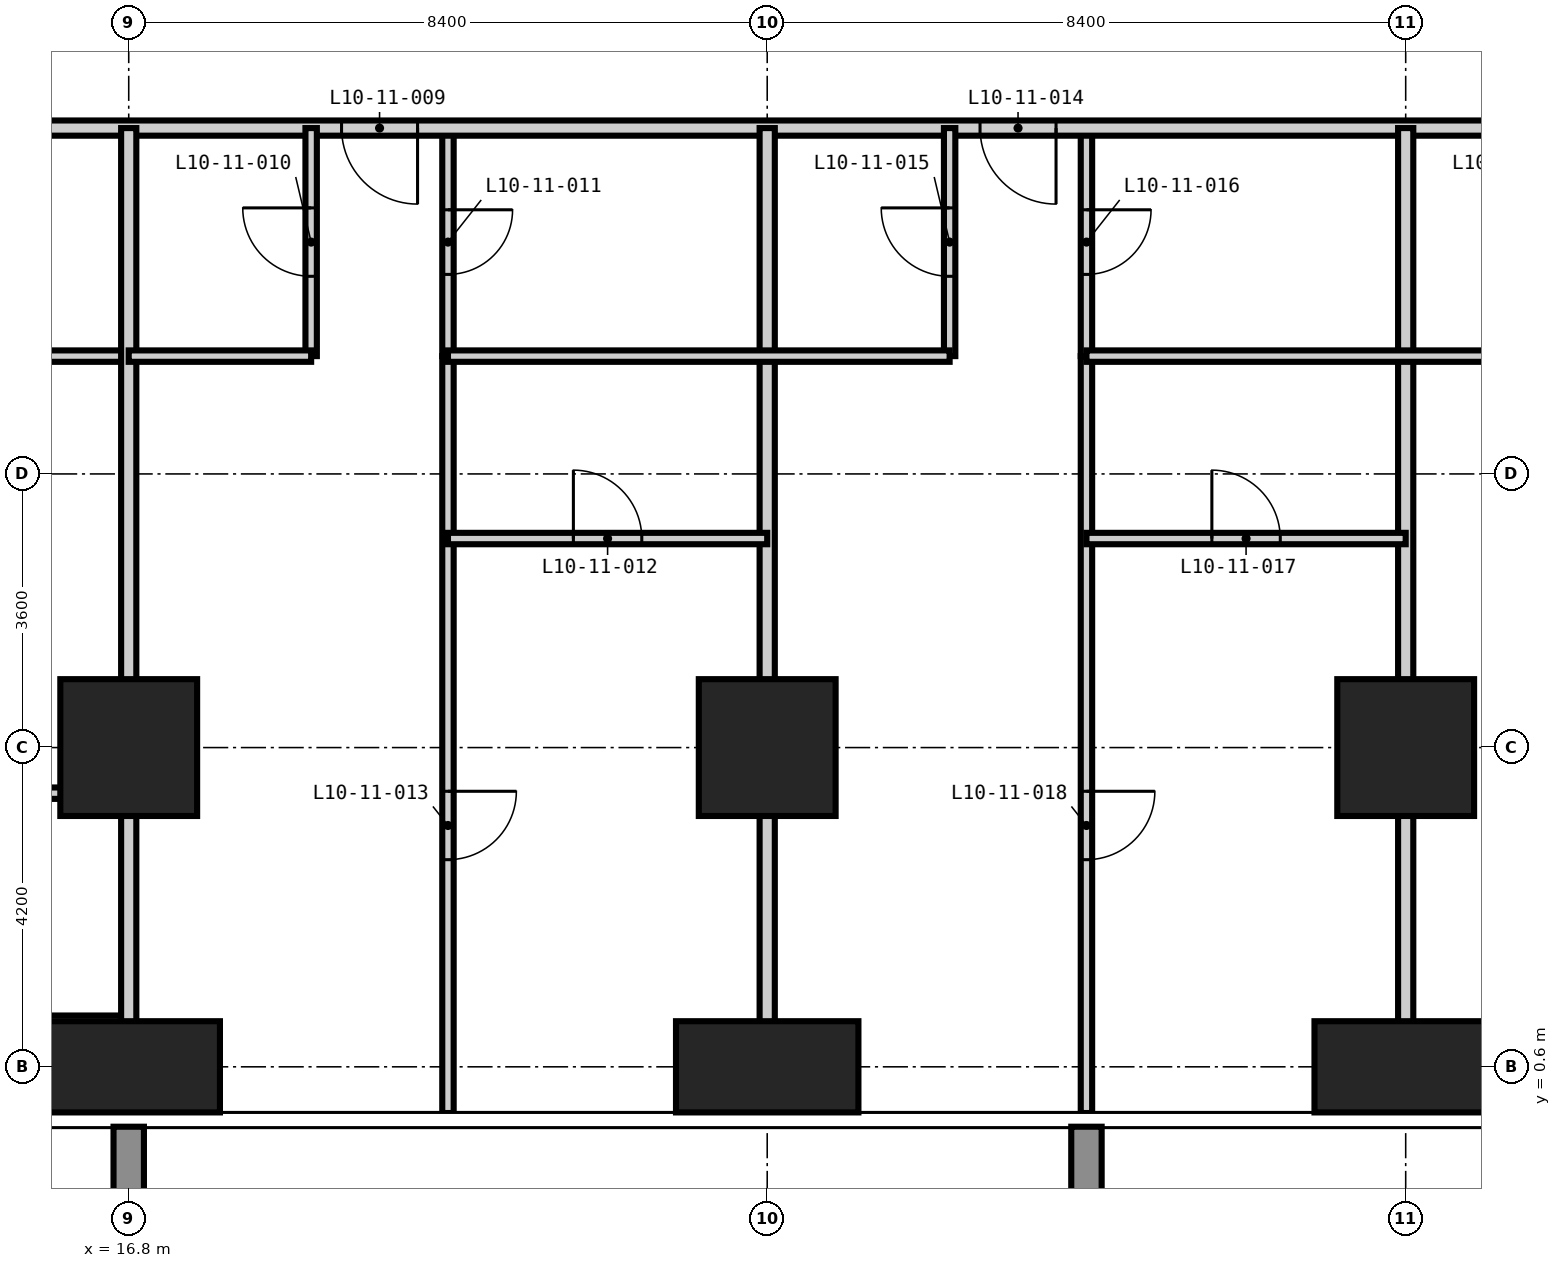
"""IFC4 building model, lengths in metres.
Left out: names, types, materials, properties, quantities, classifications, styles, units other than length and angle.
Written with IfcOpenShell. Run it as: python <this file> out.ifc"""

import sys

from ifc_helpers import new_model, si_unit, direction, frame, frame_2d, origin, origin_2d, place, context, subcontext, project, spatial, rectangle, extrude, element, fill, save


model = new_model("IFC4")
c1 = context("Model", 3, precision=1e-05, world=origin(), true_north=direction((0.0, 1.0)))
c2 = subcontext(c1, "Body", "Model", "MODEL_VIEW")
j1 = project(units=[si_unit("LENGTHUNIT", "METRE"), si_unit("PLANEANGLEUNIT", "RADIAN")], contexts=[c1])
p1 = place(None, origin())
s1 = spatial("IfcSite", under=j1, at=p1, CompositionType="ELEMENT")
p2 = place(p1, origin())
s2 = spatial("IfcBuilding", under=s1, at=p2, CompositionType="ELEMENT")
p3 = place(p2, frame((0.0, 0.0, 45.0)))
s3 = spatial("IfcBuildingStorey", under=s2, at=p3, CompositionType="ELEMENT", Elevation=45.0)
p4 = place(p3, frame((16.8, 0.6, -0.35), z_axis=(0.0, 0.0, 1.0), x_axis=(1.0, 0.0, 0.0)))
e1 = element("IfcColumn", 1, at=p4, inside=s3, PredefinedType="COLUMN", context=c2, shape_type="SweptSolid", body=[
    extrude(rectangle(XDim=2.4, YDim=1.2, at=origin_2d()), origin(), (0.0, 0.0, 1.0), 3.6),
])
p5 = place(p3, frame((16.8, 4.8, -0.35), z_axis=(0.0, 0.0, 1.0), x_axis=(1.0, 0.0, 0.0)))
e2 = element("IfcColumn", 2, at=p5, inside=s3, PredefinedType="COLUMN", context=c2, shape_type="SweptSolid", body=[
    extrude(rectangle(XDim=1.8, YDim=1.8, at=origin_2d()), origin(), (0.0, 0.0, 1.0), 3.6),
])
p6 = place(p3, frame((25.2, 0.6, -0.35), z_axis=(0.0, 0.0, 1.0), x_axis=(1.0, 0.0, 0.0)))
e3 = element("IfcColumn", 3, at=p6, inside=s3, PredefinedType="COLUMN", context=c2, shape_type="SweptSolid", body=[
    extrude(rectangle(XDim=2.4, YDim=1.2, at=origin_2d()), origin(), (0.0, 0.0, 1.0), 3.6),
])
p7 = place(p3, frame((25.2, 4.8, -0.35), z_axis=(0.0, 0.0, 1.0), x_axis=(1.0, 0.0, 0.0)))
e4 = element("IfcColumn", 4, at=p7, inside=s3, PredefinedType="COLUMN", context=c2, shape_type="SweptSolid", body=[
    extrude(rectangle(XDim=1.8, YDim=1.8, at=origin_2d()), origin(), (0.0, 0.0, 1.0), 3.6),
])
p8 = place(p3, frame((33.6, 0.6, -0.35), z_axis=(0.0, 0.0, 1.0), x_axis=(1.0, 0.0, 0.0)))
e5 = element("IfcColumn", 5, at=p8, inside=s3, PredefinedType="COLUMN", context=c2, shape_type="SweptSolid", body=[
    extrude(rectangle(XDim=2.4, YDim=1.2, at=origin_2d()), origin(), (0.0, 0.0, 1.0), 3.6),
])
p9 = place(p3, frame((33.6, 4.8, -0.35), z_axis=(0.0, 0.0, 1.0), x_axis=(1.0, 0.0, 0.0)))
e6 = element("IfcColumn", 6, at=p9, inside=s3, PredefinedType="COLUMN", context=c2, shape_type="SweptSolid", body=[
    extrude(rectangle(XDim=1.8, YDim=1.8, at=origin_2d()), origin(), (0.0, 0.0, 1.0), 3.6),
])
p10 = place(p3, frame((21.0, 9.95, 0.0), z_axis=(0.0, 0.0, 1.0), x_axis=(0.0, 1.0, 0.0)))
e7 = element("IfcWall", 7, at=p10, inside=s3, PredefinedType="PARTITIONING", context=c2, shape_type="SweptSolid", body=[
    extrude(rectangle(XDim=3.0, YDim=0.15, at=frame_2d((1.5, 0.0))), origin(), (0.0, 0.0, 1.0), 3.25),
])
p11 = place(p10, frame((1.075, 0.0, 0.0)))
e8 = element("IfcOpeningElement", 8, at=p11, cuts=e7, PredefinedType="OPENING", context=c2, shape_type="SweptSolid", body=[
    extrude(rectangle(XDim=0.85, YDim=2.1, at=frame_2d((0.425, 1.05))), frame((0.0, 0.085, 0.0), z_axis=(0.0, -1.0, 0.0), x_axis=(1.0, 0.0, 0.0)), (0.0, 0.0, 1.0), 0.17),
])
p12 = place(p3, frame((29.4, 9.95, 0.0), z_axis=(0.0, 0.0, 1.0), x_axis=(0.0, 1.0, 0.0)))
e9 = element("IfcWall", 9, at=p12, inside=s3, PredefinedType="PARTITIONING", context=c2, shape_type="SweptSolid", body=[
    extrude(rectangle(XDim=3.0, YDim=0.15, at=frame_2d((1.5, 0.0))), origin(), (0.0, 0.0, 1.0), 3.25),
])
p13 = place(p12, frame((1.075, 0.0, 0.0)))
e10 = element("IfcOpeningElement", 10, at=p13, cuts=e9, PredefinedType="OPENING", context=c2, shape_type="SweptSolid", body=[
    extrude(rectangle(XDim=0.85, YDim=2.1, at=frame_2d((0.425, 1.05))), frame((0.0, 0.085, 0.0), z_axis=(0.0, -1.0, 0.0), x_axis=(1.0, 0.0, 0.0)), (0.0, 0.0, 1.0), 0.17),
])
p14 = place(p3, frame((13.2, 1.2, 0.0), z_axis=(0.0, 0.0, 1.0), x_axis=(1.0, 0.0, 0.0)))
e11 = element("IfcWall", 11, at=p14, inside=s3, PredefinedType="PARTITIONING", context=c2, shape_type="SweptSolid", body=[
    extrude(rectangle(XDim=3.6, YDim=0.15, at=frame_2d((1.8, 0.0))), origin(), (0.0, 0.0, 1.0), 3.25),
])
p15 = place(p14, frame((1.375, 0.0, 0.0)))
e12 = element("IfcOpeningElement", 12, at=p15, cuts=e11, PredefinedType="OPENING", context=c2, shape_type="SweptSolid", body=[
    extrude(rectangle(XDim=0.85, YDim=2.1, at=frame_2d((0.425, 1.05))), frame((0.0, 0.085, 0.0), z_axis=(0.0, -1.0, 0.0), x_axis=(1.0, 0.0, 0.0)), (0.0, 0.0, 1.0), 0.17),
])
p16 = place(p3, frame((12.95, 9.95, 0.0), z_axis=(0.0, 0.0, 1.0), x_axis=(1.0, 0.0, 0.0)))
e13 = element("IfcWall", 13, at=p16, inside=s3, PredefinedType="PARTITIONING", context=c2, shape_type="SweptSolid", body=[
    extrude(rectangle(XDim=3.85, YDim=0.15, at=frame_2d((1.925, 0.0))), origin(), (0.0, 0.0, 1.0), 3.25),
])
p17 = place(p16, frame((1.5, 0.0, 0.0)))
e14 = element("IfcOpeningElement", 14, at=p17, cuts=e13, PredefinedType="OPENING", context=c2, shape_type="SweptSolid", body=[
    extrude(rectangle(XDim=0.85, YDim=2.1, at=frame_2d((0.425, 1.05))), frame((0.0, 0.085, 0.0), z_axis=(0.0, -1.0, 0.0), x_axis=(1.0, 0.0, 0.0)), (0.0, 0.0, 1.0), 0.17),
])
p18 = place(p3, frame((45.25, 12.95, 0.0), z_axis=(0.0, 0.0, 1.0), x_axis=(-1.0, 0.0, 0.0)))
e15 = element("IfcWall", 15, at=p18, inside=s3, PredefinedType="PARTITIONING", context=c2, shape_type="SweptSolid", body=[
    extrude(rectangle(XDim=32.3, YDim=0.2, at=frame_2d((16.15, 0.0))), origin(), (0.0, 0.0, 1.0), 3.25),
])
p19 = place(p18, frame((24.65, 0.0, 0.0)))
e16 = element("IfcOpeningElement", 16, at=p19, cuts=e15, PredefinedType="OPENING", context=c2, shape_type="SweptSolid", body=[
    extrude(rectangle(XDim=1.0, YDim=2.2, at=frame_2d((0.5, 1.1))), frame((0.0, 0.11, 0.0), z_axis=(0.0, -1.0, 0.0), x_axis=(1.0, 0.0, 0.0)), (0.0, 0.0, 1.0), 0.22),
])
p20 = place(p18, frame((16.25, 0.0, 0.0)))
e17 = element("IfcOpeningElement", 17, at=p20, cuts=e15, PredefinedType="OPENING", context=c2, shape_type="SweptSolid", body=[
    extrude(rectangle(XDim=1.0, YDim=2.2, at=frame_2d((0.5, 1.1))), frame((0.0, 0.11, 0.0), z_axis=(0.0, -1.0, 0.0), x_axis=(1.0, 0.0, 0.0)), (0.0, 0.0, 1.0), 0.22),
])
p21 = place(p18, frame((7.85, 0.0, 0.0)))
e18 = element("IfcOpeningElement", 18, at=p21, cuts=e15, PredefinedType="OPENING", context=c2, shape_type="SweptSolid", body=[
    extrude(rectangle(XDim=1.0, YDim=2.2, at=frame_2d((0.5, 1.1))), frame((0.0, 0.11, 0.0), z_axis=(0.0, -1.0, 0.0), x_axis=(1.0, 0.0, 0.0)), (0.0, 0.0, 1.0), 0.22),
])
for number, where, z_axis, x_axis in (
    (19, (16.8, -0.008, 0.0), (0.0, 0.0, 1.0), (0.0, 1.0, 0.0)),
    (20, (25.2, -0.008, 0.0), (0.0, 0.0, 1.0), (0.0, 1.0, 0.0)),
    (21, (33.6, -0.008, 0.0), (0.0, 0.0, 1.0), (0.0, 1.0, 0.0)),
):
    element("IfcWall", number, at=place(p3, frame(where, z_axis=z_axis, x_axis=x_axis)), inside=s3, PredefinedType="PARTITIONING", context=c2, shape_type="SweptSolid", body=[
        extrude(rectangle(XDim=12.958, YDim=0.2, at=frame_2d((6.479, 0.0))), origin(), (0.0, 0.0, 1.0), 3.25),
    ])
p22 = place(p3, frame((19.2, 9.95, 0.0), z_axis=(0.0, 0.0, 1.0), x_axis=(0.0, 1.0, 0.0)))
e22 = element("IfcWall", 22, at=p22, inside=s3, PredefinedType="PARTITIONING", context=c2, shape_type="SweptSolid", body=[
    extrude(rectangle(XDim=3.0, YDim=0.15, at=frame_2d((1.5, 0.0))), origin(), (0.0, 0.0, 1.0), 3.25),
])
p23 = place(p22, frame((1.05, 0.0, 0.0)))
e23 = element("IfcOpeningElement", 23, at=p23, cuts=e22, PredefinedType="OPENING", context=c2, shape_type="SweptSolid", body=[
    extrude(rectangle(XDim=0.9, YDim=2.1, at=frame_2d((0.45, 1.05))), frame((0.0, 0.085, 0.0), z_axis=(0.0, -1.0, 0.0), x_axis=(1.0, 0.0, 0.0)), (0.0, 0.0, 1.0), 0.17),
])
p24 = place(p3, frame((21.0, -0.008, 0.0), z_axis=(0.0, 0.0, 1.0), x_axis=(0.0, 1.0, 0.0)))
e24 = element("IfcWall", 24, at=p24, inside=s3, PredefinedType="PARTITIONING", context=c2, shape_type="SweptSolid", body=[
    extrude(rectangle(XDim=9.958, YDim=0.15, at=frame_2d((4.979, 0.0))), origin(), (0.0, 0.0, 1.0), 3.25),
])
p25 = place(p24, frame((3.333, 0.0, 0.0)))
e25 = element("IfcOpeningElement", 25, at=p25, cuts=e24, PredefinedType="OPENING", context=c2, shape_type="SweptSolid", body=[
    extrude(rectangle(XDim=0.9, YDim=2.1, at=frame_2d((0.45, 1.05))), frame((0.0, 0.085, 0.0), z_axis=(0.0, -1.0, 0.0), x_axis=(1.0, 0.0, 0.0)), (0.0, 0.0, 1.0), 0.17),
])
p26 = place(p3, frame((27.6, 9.95, 0.0), z_axis=(0.0, 0.0, 1.0), x_axis=(0.0, 1.0, 0.0)))
e26 = element("IfcWall", 26, at=p26, inside=s3, PredefinedType="PARTITIONING", context=c2, shape_type="SweptSolid", body=[
    extrude(rectangle(XDim=3.0, YDim=0.15, at=frame_2d((1.5, 0.0))), origin(), (0.0, 0.0, 1.0), 3.25),
])
p27 = place(p26, frame((1.05, 0.0, 0.0)))
e27 = element("IfcOpeningElement", 27, at=p27, cuts=e26, PredefinedType="OPENING", context=c2, shape_type="SweptSolid", body=[
    extrude(rectangle(XDim=0.9, YDim=2.1, at=frame_2d((0.45, 1.05))), frame((0.0, 0.085, 0.0), z_axis=(0.0, -1.0, 0.0), x_axis=(1.0, 0.0, 0.0)), (0.0, 0.0, 1.0), 0.17),
])
p28 = place(p3, frame((29.4, -0.008, 0.0), z_axis=(0.0, 0.0, 1.0), x_axis=(0.0, 1.0, 0.0)))
e28 = element("IfcWall", 28, at=p28, inside=s3, PredefinedType="PARTITIONING", context=c2, shape_type="SweptSolid", body=[
    extrude(rectangle(XDim=9.958, YDim=0.15, at=frame_2d((4.979, 0.0))), origin(), (0.0, 0.0, 1.0), 3.25),
])
p29 = place(p28, frame((3.333, 0.0, 0.0)))
e29 = element("IfcOpeningElement", 29, at=p29, cuts=e28, PredefinedType="OPENING", context=c2, shape_type="SweptSolid", body=[
    extrude(rectangle(XDim=0.9, YDim=2.1, at=frame_2d((0.45, 1.05))), frame((0.0, 0.085, 0.0), z_axis=(0.0, -1.0, 0.0), x_axis=(1.0, 0.0, 0.0)), (0.0, 0.0, 1.0), 0.17),
])
p30 = place(p3, frame((-0.008, 4.2, 0.0), z_axis=(0.0, 0.0, 1.0), x_axis=(1.0, 0.0, 0.0)))
e30 = element("IfcWall", 30, at=p30, inside=s3, PredefinedType="PARTITIONING", context=c2, shape_type="SweptSolid", body=[
    extrude(rectangle(XDim=16.808, YDim=0.15, at=frame_2d((8.404, 0.0))), origin(), (0.0, 0.0, 1.0), 3.25),
])
p31 = place(p30, frame((4.958, 0.0, 0.0)))
e31 = element("IfcOpeningElement", 31, at=p31, cuts=e30, PredefinedType="OPENING", context=c2, shape_type="SweptSolid", body=[
    extrude(rectangle(XDim=0.9, YDim=2.1, at=frame_2d((0.45, 1.05))), frame((0.0, 0.085, 0.0), z_axis=(0.0, -1.0, 0.0), x_axis=(1.0, 0.0, 0.0)), (0.0, 0.0, 1.0), 0.17),
])
p32 = place(p3, frame((21.0, 7.55, 0.0), z_axis=(0.0, 0.0, 1.0), x_axis=(1.0, 0.0, 0.0)))
e32 = element("IfcWall", 32, at=p32, inside=s3, PredefinedType="PARTITIONING", context=c2, shape_type="SweptSolid", body=[
    extrude(rectangle(XDim=4.2, YDim=0.15, at=frame_2d((2.1, 0.0))), origin(), (0.0, 0.0, 1.0), 3.25),
])
p33 = place(p32, frame((1.65, 0.0, 0.0)))
e33 = element("IfcOpeningElement", 33, at=p33, cuts=e32, PredefinedType="OPENING", context=c2, shape_type="SweptSolid", body=[
    extrude(rectangle(XDim=0.9, YDim=2.1, at=frame_2d((0.45, 1.05))), frame((0.0, 0.085, 0.0), z_axis=(0.0, -1.0, 0.0), x_axis=(1.0, 0.0, 0.0)), (0.0, 0.0, 1.0), 0.17),
])
p34 = place(p3, frame((29.4, 7.55, 0.0), z_axis=(0.0, 0.0, 1.0), x_axis=(1.0, 0.0, 0.0)))
e34 = element("IfcWall", 34, at=p34, inside=s3, PredefinedType="PARTITIONING", context=c2, shape_type="SweptSolid", body=[
    extrude(rectangle(XDim=4.2, YDim=0.15, at=frame_2d((2.1, 0.0))), origin(), (0.0, 0.0, 1.0), 3.25),
])
p35 = place(p34, frame((1.65, 0.0, 0.0)))
e35 = element("IfcOpeningElement", 35, at=p35, cuts=e34, PredefinedType="OPENING", context=c2, shape_type="SweptSolid", body=[
    extrude(rectangle(XDim=0.9, YDim=2.1, at=frame_2d((0.45, 1.05))), frame((0.0, 0.085, 0.0), z_axis=(0.0, -1.0, 0.0), x_axis=(1.0, 0.0, 0.0)), (0.0, 0.0, 1.0), 0.17),
])
p36 = place(p3, frame((16.8, 9.95, 0.0), z_axis=(0.0, 0.0, 1.0), x_axis=(1.0, 0.0, 0.0)))
e36 = element("IfcWall", 36, at=p36, inside=s3, PredefinedType="PARTITIONING", context=c2, shape_type="SweptSolid", body=[
    extrude(rectangle(XDim=2.4, YDim=0.15, at=frame_2d((1.2, 0.0))), origin(), (0.0, 0.0, 1.0), 3.25),
])
for number, where, z_axis, x_axis in (
    (37, (21.0, 9.95, 0.0), (0.0, 0.0, 1.0), (1.0, 0.0, 0.0)),
    (38, (29.4, 9.95, 0.0), (0.0, 0.0, 1.0), (1.0, 0.0, 0.0)),
):
    element("IfcWall", number, at=place(p3, frame(where, z_axis=z_axis, x_axis=x_axis)), inside=s3, PredefinedType="PARTITIONING", context=c2, shape_type="SweptSolid", body=[
        extrude(rectangle(XDim=6.6, YDim=0.15, at=frame_2d((3.3, 0.0))), origin(), (0.0, 0.0, 1.0), 3.25),
    ])
p37 = place(p19, origin())
e39 = element("IfcDoor", 39, at=p37, inside=s3, OperationType="SINGLE_SWING_LEFT", PredefinedType="DOOR", context=c2, shape_type="SweptSolid", body=[
    extrude(rectangle(XDim=1.0, YDim=2.2, at=frame_2d((0.5, 1.1))), frame((0.0, 0.025, 0.0), z_axis=(0.0, -1.0, 0.0), x_axis=(1.0, 0.0, 0.0)), (0.0, 0.0, 1.0), 0.05),
])
fill(e16, e39)
p38 = place(p23, origin())
e40 = element("IfcDoor", 40, at=p38, inside=s3, OperationType="SINGLE_SWING_RIGHT", PredefinedType="DOOR", context=c2, shape_type="SweptSolid", body=[
    extrude(rectangle(XDim=0.9, YDim=2.1, at=frame_2d((0.45, 1.05))), frame((0.0, 0.025, 0.0), z_axis=(0.0, -1.0, 0.0), x_axis=(1.0, 0.0, 0.0)), (0.0, 0.0, 1.0), 0.05),
])
fill(e23, e40)
p39 = place(p11, frame((0.85, 0.0, 0.0), z_axis=(0.0, 0.0, 1.0), x_axis=(-1.0, 0.0, 0.0)))
e41 = element("IfcDoor", 41, at=p39, inside=s3, OperationType="SINGLE_SWING_LEFT", PredefinedType="DOOR", context=c2, shape_type="SweptSolid", body=[
    extrude(rectangle(XDim=0.85, YDim=2.1, at=frame_2d((0.425, 1.05))), frame((0.0, 0.025, 0.0), z_axis=(0.0, -1.0, 0.0), x_axis=(1.0, 0.0, 0.0)), (0.0, 0.0, 1.0), 0.05),
])
fill(e8, e41)
p40 = place(p33, origin())
e42 = element("IfcDoor", 42, at=p40, inside=s3, OperationType="SINGLE_SWING_LEFT", PredefinedType="DOOR", context=c2, shape_type="SweptSolid", body=[
    extrude(rectangle(XDim=0.9, YDim=2.1, at=frame_2d((0.45, 1.05))), frame((0.0, 0.025, 0.0), z_axis=(0.0, -1.0, 0.0), x_axis=(1.0, 0.0, 0.0)), (0.0, 0.0, 1.0), 0.05),
])
fill(e33, e42)
p41 = place(p25, frame((0.9, 0.0, 0.0), z_axis=(0.0, 0.0, 1.0), x_axis=(-1.0, 0.0, 0.0)))
e43 = element("IfcDoor", 43, at=p41, inside=s3, OperationType="SINGLE_SWING_LEFT", PredefinedType="DOOR", context=c2, shape_type="SweptSolid", body=[
    extrude(rectangle(XDim=0.9, YDim=2.1, at=frame_2d((0.45, 1.05))), frame((0.0, 0.025, 0.0), z_axis=(0.0, -1.0, 0.0), x_axis=(1.0, 0.0, 0.0)), (0.0, 0.0, 1.0), 0.05),
])
fill(e25, e43)
p42 = place(p20, origin())
e44 = element("IfcDoor", 44, at=p42, inside=s3, OperationType="SINGLE_SWING_LEFT", PredefinedType="DOOR", context=c2, shape_type="SweptSolid", body=[
    extrude(rectangle(XDim=1.0, YDim=2.2, at=frame_2d((0.5, 1.1))), frame((0.0, 0.025, 0.0), z_axis=(0.0, -1.0, 0.0), x_axis=(1.0, 0.0, 0.0)), (0.0, 0.0, 1.0), 0.05),
])
fill(e17, e44)
p43 = place(p27, origin())
e45 = element("IfcDoor", 45, at=p43, inside=s3, OperationType="SINGLE_SWING_RIGHT", PredefinedType="DOOR", context=c2, shape_type="SweptSolid", body=[
    extrude(rectangle(XDim=0.9, YDim=2.1, at=frame_2d((0.45, 1.05))), frame((0.0, 0.025, 0.0), z_axis=(0.0, -1.0, 0.0), x_axis=(1.0, 0.0, 0.0)), (0.0, 0.0, 1.0), 0.05),
])
fill(e27, e45)
p44 = place(p13, frame((0.85, 0.0, 0.0), z_axis=(0.0, 0.0, 1.0), x_axis=(-1.0, 0.0, 0.0)))
e46 = element("IfcDoor", 46, at=p44, inside=s3, OperationType="SINGLE_SWING_LEFT", PredefinedType="DOOR", context=c2, shape_type="SweptSolid", body=[
    extrude(rectangle(XDim=0.85, YDim=2.1, at=frame_2d((0.425, 1.05))), frame((0.0, 0.025, 0.0), z_axis=(0.0, -1.0, 0.0), x_axis=(1.0, 0.0, 0.0)), (0.0, 0.0, 1.0), 0.05),
])
fill(e10, e46)
p45 = place(p35, origin())
e47 = element("IfcDoor", 47, at=p45, inside=s3, OperationType="SINGLE_SWING_LEFT", PredefinedType="DOOR", context=c2, shape_type="SweptSolid", body=[
    extrude(rectangle(XDim=0.9, YDim=2.1, at=frame_2d((0.45, 1.05))), frame((0.0, 0.025, 0.0), z_axis=(0.0, -1.0, 0.0), x_axis=(1.0, 0.0, 0.0)), (0.0, 0.0, 1.0), 0.05),
])
fill(e35, e47)
p46 = place(p29, frame((0.9, 0.0, 0.0), z_axis=(0.0, 0.0, 1.0), x_axis=(-1.0, 0.0, 0.0)))
e48 = element("IfcDoor", 48, at=p46, inside=s3, OperationType="SINGLE_SWING_LEFT", PredefinedType="DOOR", context=c2, shape_type="SweptSolid", body=[
    extrude(rectangle(XDim=0.9, YDim=2.1, at=frame_2d((0.45, 1.05))), frame((0.0, 0.025, 0.0), z_axis=(0.0, -1.0, 0.0), x_axis=(1.0, 0.0, 0.0)), (0.0, 0.0, 1.0), 0.05),
])
fill(e29, e48)
save(model, sys.argv[1])
